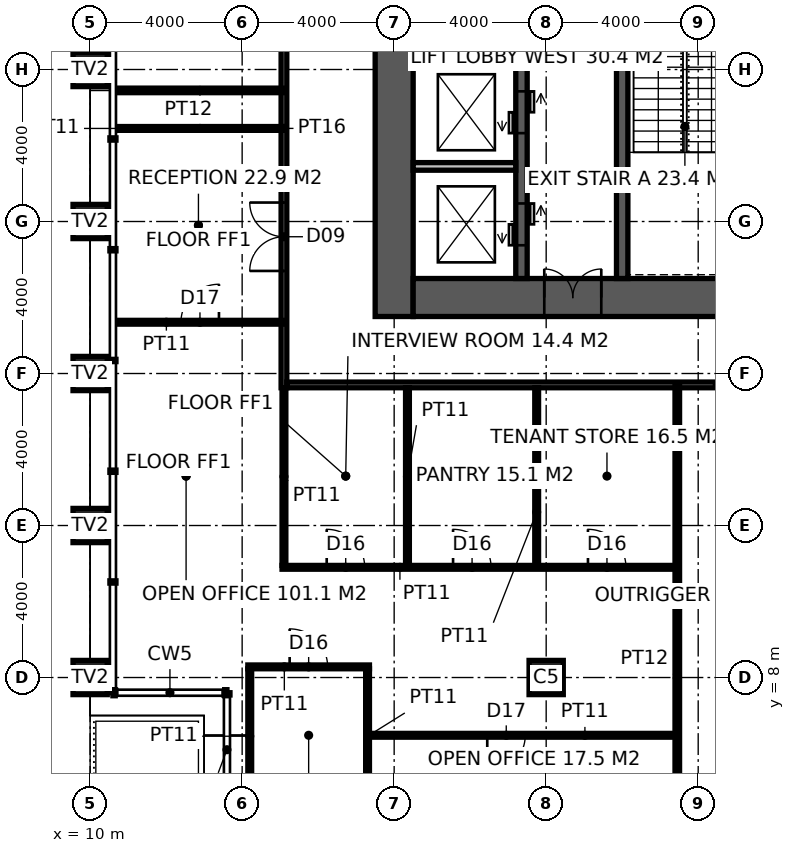
"""IFC4 building model, lengths in metres.
Left out: names, types, materials, properties, quantities, classifications, styles, units other than length and angle.
Written with IfcOpenShell. Run it as: python <this file> out.ifc"""

import sys

from ifc_helpers import new_model, si_unit, direction, frame, frame_2d, origin, origin_2d, place, context, subcontext, project, spatial, rectangle, hollow_rectangle, extrude, element, fill, save


model = new_model("IFC4")
c1 = context("Model", 3, precision=1e-05, world=origin(), true_north=direction((0.0, 1.0)))
c2 = subcontext(c1, "Body", "Model", "MODEL_VIEW")
j1 = project(units=[si_unit("LENGTHUNIT", "METRE"), si_unit("PLANEANGLEUNIT", "RADIAN")], contexts=[c1])
p1 = place(None, origin())
s1 = spatial("IfcSite", under=j1, at=p1, CompositionType="ELEMENT")
p2 = place(p1, origin())
s2 = spatial("IfcBuilding", under=s1, at=p2, CompositionType="ELEMENT")
p3 = place(p2, frame((0.0, 0.0, 105.4)))
s3 = spatial("IfcBuildingStorey", under=s2, at=p3, CompositionType="ELEMENT", Elevation=105.4)
for number, where, z_axis, x_axis in (
    (1, (10.0, 8.0, 0.0), (0.0, 0.0, 1.0), (1.0, 0.0, 0.0)),
    (2, (10.0, 12.0, 0.0), (0.0, 0.0, 1.0), (1.0, 0.0, 0.0)),
    (3, (10.0, 16.0, 0.0), (0.0, 0.0, 1.0), (1.0, 0.0, 0.0)),
    (4, (10.0, 20.0, 0.0), (0.0, 0.0, 1.0), (1.0, 0.0, 0.0)),
    (5, (10.0, 24.0, 0.0), (0.0, 0.0, 1.0), (1.0, 0.0, 0.0)),
):
    element("IfcColumn", number, at=place(p3, frame(where, z_axis=z_axis, x_axis=x_axis)), inside=s3, PredefinedType="USERDEFINED", context=c2, shape_type="SweptSolid", body=[
        extrude(hollow_rectangle(XDim=0.9, YDim=0.9, WallThickness=0.1, at=origin_2d()), origin(), (0.0, 0.0, 1.0), 4.0),
    ])
p4 = place(p3, frame((22.0, 8.0, 0.0), z_axis=(0.0, 0.0, 1.0), x_axis=(1.0, 0.0, 0.0)))
e6 = element("IfcColumn", 6, at=p4, inside=s3, PredefinedType="COLUMN", context=c2, shape_type="SweptSolid", body=[
    extrude(hollow_rectangle(XDim=0.9, YDim=0.9, WallThickness=0.1, at=origin_2d()), origin(), (0.0, 0.0, 1.0), 4.0),
])
p5 = place(p3, frame((18.0, 17.5, -0.15), z_axis=(0.0, 0.0, 1.0), x_axis=(0.0, 1.0, 0.0)))
e7 = element("IfcWall", 7, at=p5, inside=s3, PredefinedType="SHEAR", context=c2, shape_type="SweptSolid", body=[
    extrude(rectangle(XDim=19.0, YDim=1.0, at=frame_2d((9.5, 0.0))), origin(), (0.0, 0.0, 1.0), 4.0),
])
p6 = place(p3, frame((18.5, 18.0, -0.15), z_axis=(0.0, 0.0, 1.0), x_axis=(1.0, 0.0, 0.0)))
e8 = element("IfcWall", 8, at=p6, inside=s3, PredefinedType="SHEAR", context=c2, shape_type="SweptSolid", body=[
    extrude(rectangle(XDim=17.6, YDim=1.0, at=frame_2d((8.8, 0.0))), origin(), (0.0, 0.0, 1.0), 4.0),
])
p7 = place(p6, frame((3.45, 0.0, 0.15)))
e9 = element("IfcOpeningElement", 9, at=p7, cuts=e8, PredefinedType="OPENING", context=c2, shape_type="SweptSolid", body=[
    extrude(rectangle(XDim=1.5, YDim=2.4, at=frame_2d((0.75, 1.2))), frame((0.0, 0.51, 0.0), z_axis=(0.0, -1.0, 0.0), x_axis=(1.0, 0.0, 0.0)), (0.0, 0.0, 1.0), 1.02),
])
p8 = place(p3, frame((24.0, 18.5, -0.15), z_axis=(0.0, 0.0, 1.0), x_axis=(0.0, 1.0, 0.0)))
e10 = element("IfcWall", 10, at=p8, inside=s3, PredefinedType="SHEAR", context=c2, shape_type="SweptSolid", body=[
    extrude(rectangle(XDim=17.0, YDim=0.3, at=frame_2d((8.5, 0.0))), origin(), (0.0, 0.0, 1.0), 4.0),
])
p9 = place(p8, frame((9.6, 0.0, 0.15)))
e11 = element("IfcOpeningElement", 11, at=p9, cuts=e10, PredefinedType="OPENING", context=c2, shape_type="SweptSolid", body=[
    extrude(rectangle(XDim=1.5, YDim=2.4, at=frame_2d((0.75, 1.2))), frame((0.0, 0.16, 0.0), z_axis=(0.0, -1.0, 0.0), x_axis=(1.0, 0.0, 0.0)), (0.0, 0.0, 1.0), 0.32),
])
p10 = place(p3, frame((21.35, 18.5, -0.15), z_axis=(0.0, 0.0, 1.0), x_axis=(0.0, 1.0, 0.0)))
e12 = element("IfcWall", 12, at=p10, inside=s3, PredefinedType="SHEAR", context=c2, shape_type="SweptSolid", body=[
    extrude(rectangle(XDim=12.5, YDim=0.3, at=frame_2d((6.25, 0.0))), origin(), (0.0, 0.0, 1.0), 4.0),
])
p11 = place(p10, frame((0.875, 0.0, 0.15)))
e13 = element("IfcOpeningElement", 13, at=p11, cuts=e12, PredefinedType="OPENING", context=c2, shape_type="SweptSolid", body=[
    extrude(rectangle(XDim=1.1, YDim=2.2, at=frame_2d((0.55, 1.1))), frame((0.0, 0.16, 0.0), z_axis=(0.0, -1.0, 0.0), x_axis=(1.0, 0.0, 0.0)), (0.0, 0.0, 1.0), 0.32),
])
p12 = place(p10, frame((3.825, 0.0, 0.15)))
e14 = element("IfcOpeningElement", 14, at=p12, cuts=e12, PredefinedType="OPENING", context=c2, shape_type="SweptSolid", body=[
    extrude(rectangle(XDim=1.1, YDim=2.2, at=frame_2d((0.55, 1.1))), frame((0.0, 0.16, 0.0), z_axis=(0.0, -1.0, 0.0), x_axis=(1.0, 0.0, 0.0)), (0.0, 0.0, 1.0), 0.32),
])
p13 = place(p10, frame((6.675, 0.0, 0.15)))
e15 = element("IfcOpeningElement", 15, at=p13, cuts=e12, PredefinedType="OPENING", context=c2, shape_type="SweptSolid", body=[
    extrude(rectangle(XDim=1.1, YDim=2.2, at=frame_2d((0.55, 1.1))), frame((0.0, 0.16, 0.0), z_axis=(0.0, -1.0, 0.0), x_axis=(1.0, 0.0, 0.0)), (0.0, 0.0, 1.0), 0.32),
])
p14 = place(p10, frame((9.575, 0.0, 0.15)))
e16 = element("IfcOpeningElement", 16, at=p14, cuts=e12, PredefinedType="OPENING", context=c2, shape_type="SweptSolid", body=[
    extrude(rectangle(XDim=1.1, YDim=2.2, at=frame_2d((0.55, 1.1))), frame((0.0, 0.16, 0.0), z_axis=(0.0, -1.0, 0.0), x_axis=(1.0, 0.0, 0.0)), (0.0, 0.0, 1.0), 0.32),
])
for number, where, z_axis, x_axis in (
    (17, (18.5, 21.45, -0.15), (0.0, 0.0, 1.0), (1.0, 0.0, 0.0)),
    (18, (18.5, 24.3, -0.15), (0.0, 0.0, 1.0), (1.0, 0.0, 0.0)),
):
    element("IfcWall", number, at=place(p3, frame(where, z_axis=z_axis, x_axis=x_axis)), inside=s3, PredefinedType="SOLIDWALL", context=c2, shape_type="SweptSolid", body=[
        extrude(rectangle(XDim=2.7, YDim=0.2, at=frame_2d((1.35, 0.0))), origin(), (0.0, 0.0, 1.0), 4.0),
    ])
p15 = place(p3, frame((15.1, 15.625, 0.0), z_axis=(0.0, 0.0, 1.0), x_axis=(0.0, 1.0, 0.0)))
e19 = element("IfcWall", 19, at=p15, inside=s3, PredefinedType="PARTITIONING", context=c2, shape_type="SweptSolid", body=[
    extrude(rectangle(XDim=22.75, YDim=0.15, at=frame_2d((11.375, 0.0))), origin(), (0.0, 0.0, 1.0), 3.85),
])
p16 = place(p15, frame((3.074, 0.0, 0.0)))
e20 = element("IfcOpeningElement", 20, at=p16, cuts=e19, PredefinedType="OPENING", context=c2, shape_type="SweptSolid", body=[
    extrude(rectangle(XDim=1.8, YDim=2.4, at=frame_2d((0.9, 1.2))), frame((0.0, 0.085, 0.0), z_axis=(0.0, -1.0, 0.0), x_axis=(1.0, 0.0, 0.0)), (0.0, 0.0, 1.0), 0.17),
])
p17 = place(p15, frame((16.876, 0.0, 0.0)))
e21 = element("IfcOpeningElement", 21, at=p17, cuts=e19, PredefinedType="OPENING", context=c2, shape_type="SweptSolid", body=[
    extrude(rectangle(XDim=1.8, YDim=2.4, at=frame_2d((0.9, 1.2))), frame((0.0, 0.085, 0.0), z_axis=(0.0, -1.0, 0.0), x_axis=(1.0, 0.0, 0.0)), (0.0, 0.0, 1.0), 0.17),
])
p18 = place(p15, frame((9.875, 0.0, 0.0)))
e22 = element("IfcOpeningElement", 22, at=p18, cuts=e19, PredefinedType="OPENING", context=c2, shape_type="SweptSolid", body=[
    extrude(rectangle(XDim=1.0, YDim=2.2, at=frame_2d((0.5, 1.1))), frame((0.0, 0.085, 0.0), z_axis=(0.0, -1.0, 0.0), x_axis=(1.0, 0.0, 0.0)), (0.0, 0.0, 1.0), 0.17),
])
p19 = place(p3, frame((15.175, 15.7, 0.0), z_axis=(0.0, 0.0, 1.0), x_axis=(1.0, 0.0, 0.0)))
e23 = element("IfcWall", 23, at=p19, inside=s3, PredefinedType="PARTITIONING", context=c2, shape_type="SweptSolid", body=[
    extrude(rectangle(XDim=22.65, YDim=0.15, at=frame_2d((11.325, 0.0))), origin(), (0.0, 0.0, 1.0), 3.85),
])
p20 = place(p19, frame((12.325, 0.0, 0.0)))
e24 = element("IfcOpeningElement", 24, at=p20, cuts=e23, PredefinedType="OPENING", context=c2, shape_type="SweptSolid", body=[
    extrude(rectangle(XDim=1.0, YDim=2.2, at=frame_2d((0.5, 1.1))), frame((0.0, 0.085, 0.0), z_axis=(0.0, -1.0, 0.0), x_axis=(1.0, 0.0, 0.0)), (0.0, 0.0, 1.0), 0.17),
])
p21 = place(p3, frame((25.45, 4.68, 0.0), z_axis=(0.0, 0.0, 1.0), x_axis=(0.0, 1.0, 0.0)))
e25 = element("IfcWall", 25, at=p21, inside=s3, PredefinedType="PARTITIONING", context=c2, shape_type="SweptSolid", body=[
    extrude(rectangle(XDim=11.02, YDim=0.12, at=frame_2d((5.51, 0.0))), origin(), (0.0, 0.0, 1.0), 2.65),
])
p22 = place(p3, frame((10.68, 23.45, 0.0), z_axis=(0.0, 0.0, 1.0), x_axis=(1.0, 0.0, 0.0)))
e26 = element("IfcWall", 26, at=p22, inside=s3, PredefinedType="PARTITIONING", context=c2, shape_type="SweptSolid", body=[
    extrude(rectangle(XDim=4.42, YDim=0.12, at=frame_2d((2.21, 0.0))), origin(), (0.0, 0.0, 1.0), 2.65),
])
p23 = place(p3, frame((14.15, 8.28, 0.0), z_axis=(0.0, 0.0, 1.0), x_axis=(1.0, 0.0, 0.0)))
e27 = element("IfcWall", 27, at=p23, inside=s3, PredefinedType="PARTITIONING", context=c2, shape_type="SweptSolid", body=[
    extrude(rectangle(XDim=3.2, YDim=0.1, at=frame_2d((1.6, 0.0))), origin(), (0.0, 0.0, 1.0), 3.85),
])
p24 = place(p23, frame((1.1, 0.0, 0.0)))
e28 = element("IfcOpeningElement", 28, at=p24, cuts=e27, PredefinedType="OPENING", context=c2, shape_type="SweptSolid", body=[
    extrude(rectangle(XDim=1.0, YDim=2.2, at=frame_2d((0.5, 1.1))), frame((0.0, 0.06, 0.0), z_axis=(0.0, -1.0, 0.0), x_axis=(1.0, 0.0, 0.0)), (0.0, 0.0, 1.0), 0.12),
])
p25 = place(p3, frame((15.05, 10.9, 0.0), z_axis=(0.0, 0.0, 1.0), x_axis=(1.0, 0.0, 0.0)))
e29 = element("IfcWall", 29, at=p25, inside=s3, PredefinedType="PARTITIONING", context=c2, shape_type="SweptSolid", body=[
    extrude(rectangle(XDim=10.339, YDim=0.1, at=frame_2d((5.169, 0.0))), origin(), (0.0, 0.0, 1.0), 3.85),
])
p26 = place(p25, frame((1.175, 0.0, 0.0)))
e30 = element("IfcOpeningElement", 30, at=p26, cuts=e29, PredefinedType="OPENING", context=c2, shape_type="SweptSolid", body=[
    extrude(rectangle(XDim=1.0, YDim=2.2, at=frame_2d((0.5, 1.1))), frame((0.0, 0.06, 0.0), z_axis=(0.0, -1.0, 0.0), x_axis=(1.0, 0.0, 0.0)), (0.0, 0.0, 1.0), 0.12),
])
p27 = place(p25, frame((4.5, 0.0, 0.0)))
e31 = element("IfcOpeningElement", 31, at=p27, cuts=e29, PredefinedType="OPENING", context=c2, shape_type="SweptSolid", body=[
    extrude(rectangle(XDim=1.0, YDim=2.2, at=frame_2d((0.5, 1.1))), frame((0.0, 0.06, 0.0), z_axis=(0.0, -1.0, 0.0), x_axis=(1.0, 0.0, 0.0)), (0.0, 0.0, 1.0), 0.12),
])
p28 = place(p25, frame((8.05, 0.0, 0.0)))
e32 = element("IfcOpeningElement", 32, at=p28, cuts=e29, PredefinedType="OPENING", context=c2, shape_type="SweptSolid", body=[
    extrude(rectangle(XDim=1.0, YDim=2.2, at=frame_2d((0.5, 1.1))), frame((0.0, 0.06, 0.0), z_axis=(0.0, -1.0, 0.0), x_axis=(1.0, 0.0, 0.0)), (0.0, 0.0, 1.0), 0.12),
])
p29 = place(p3, frame((14.2, 4.68, 0.0), z_axis=(0.0, 0.0, 1.0), x_axis=(0.0, 1.0, 0.0)))
e33 = element("IfcWall", 33, at=p29, inside=s3, PredefinedType="PARTITIONING", context=c2, shape_type="SweptSolid", body=[
    extrude(rectangle(XDim=3.55, YDim=0.1, at=frame_2d((1.775, 0.0))), origin(), (0.0, 0.0, 1.0), 2.65),
])
p30 = place(p3, frame((15.1, 10.95, 0.0), z_axis=(0.0, 0.0, 1.0), x_axis=(0.0, 1.0, 0.0)))
e34 = element("IfcWall", 34, at=p30, inside=s3, PredefinedType="PARTITIONING", context=c2, shape_type="SweptSolid", body=[
    extrude(rectangle(XDim=4.675, YDim=0.1, at=frame_2d((2.337, 0.0))), origin(), (0.0, 0.0, 1.0), 3.85),
])
p31 = place(p3, frame((17.3, 4.68, 0.0), z_axis=(0.0, 0.0, 1.0), x_axis=(0.0, 1.0, 0.0)))
e35 = element("IfcWall", 35, at=p31, inside=s3, PredefinedType="PARTITIONING", context=c2, shape_type="SweptSolid", body=[
    extrude(rectangle(XDim=3.55, YDim=0.1, at=frame_2d((1.775, 0.0))), origin(), (0.0, 0.0, 1.0), 3.85),
])
for number, where, z_axis, x_axis in (
    (36, (18.35, 10.95, 0.0), (0.0, 0.0, 1.0), (0.0, 1.0, 0.0)),
    (37, (21.75, 10.95, 0.0), (0.0, 0.0, 1.0), (0.0, 1.0, 0.0)),
):
    element("IfcWall", number, at=place(p3, frame(where, z_axis=z_axis, x_axis=x_axis)), inside=s3, PredefinedType="PARTITIONING", context=c2, shape_type="SweptSolid", body=[
        extrude(rectangle(XDim=4.675, YDim=0.1, at=frame_2d((2.337, 0.0))), origin(), (0.0, 0.0, 1.0), 2.65),
    ])
p32 = place(p3, frame((25.449, 6.48, 0.0), z_axis=(0.0, 0.0, 1.0), x_axis=(-1.0, 0.0, 0.0)))
e38 = element("IfcWall", 38, at=p32, inside=s3, PredefinedType="PARTITIONING", context=c2, shape_type="SweptSolid", body=[
    extrude(rectangle(XDim=8.099, YDim=0.1, at=frame_2d((4.049, 0.0))), origin(), (0.0, 0.0, 1.0), 3.85),
])
p33 = place(p32, frame((4.0, 0.0, 0.0)))
e39 = element("IfcOpeningElement", 39, at=p33, cuts=e38, PredefinedType="OPENING", context=c2, shape_type="SweptSolid", body=[
    extrude(rectangle(XDim=1.0, YDim=2.2, at=frame_2d((0.5, 1.1))), frame((0.0, 0.06, 0.0), z_axis=(0.0, -1.0, 0.0), x_axis=(1.0, 0.0, 0.0)), (0.0, 0.0, 1.0), 0.12),
])
p34 = place(p3, frame((15.1, 22.449, 0.0), z_axis=(0.0, 0.0, 1.0), x_axis=(-1.0, 0.0, 0.0)))
e40 = element("IfcWall", 40, at=p34, inside=s3, PredefinedType="PARTITIONING", context=c2, shape_type="SweptSolid", body=[
    extrude(rectangle(XDim=4.42, YDim=0.1, at=frame_2d((2.21, 0.0))), origin(), (0.0, 0.0, 1.0), 3.85),
])
p35 = place(p3, frame((10.68, 17.349, 0.0), z_axis=(0.0, 0.0, 1.0), x_axis=(1.0, 0.0, 0.0)))
e41 = element("IfcWall", 41, at=p35, inside=s3, PredefinedType="PARTITIONING", context=c2, shape_type="SweptSolid", body=[
    extrude(rectangle(XDim=4.42, YDim=0.1, at=frame_2d((2.21, 0.0))), origin(), (0.0, 0.0, 1.0), 3.85),
])
p36 = place(p35, frame((1.71, 0.0, 0.0)))
e42 = element("IfcOpeningElement", 42, at=p36, cuts=e41, PredefinedType="OPENING", context=c2, shape_type="SweptSolid", body=[
    extrude(rectangle(XDim=1.0, YDim=2.2, at=frame_2d((0.5, 1.1))), frame((0.0, 0.06, 0.0), z_axis=(0.0, -1.0, 0.0), x_axis=(1.0, 0.0, 0.0)), (0.0, 0.0, 1.0), 0.12),
])
p37 = place(p7, origin())
e43 = element("IfcDoor", 43, at=p37, inside=s3, OperationType="DOUBLE_DOOR_DOUBLE_SWING", PredefinedType="DOOR", context=c2, shape_type="SweptSolid", body=[
    extrude(rectangle(XDim=1.5, YDim=2.4, at=frame_2d((0.75, 1.2))), frame((0.0, 0.025, 0.0), z_axis=(0.0, -1.0, 0.0), x_axis=(1.0, 0.0, 0.0)), (0.0, 0.0, 1.0), 0.05),
])
fill(e9, e43)
p38 = place(p16, origin())
e44 = element("IfcDoor", 44, at=p38, inside=s3, OperationType="DOUBLE_DOOR_DOUBLE_SWING", PredefinedType="DOOR", context=c2, shape_type="SweptSolid", body=[
    extrude(rectangle(XDim=1.8, YDim=2.4, at=frame_2d((0.9, 1.2))), frame((0.0, 0.025, 0.0), z_axis=(0.0, -1.0, 0.0), x_axis=(1.0, 0.0, 0.0)), (0.0, 0.0, 1.0), 0.05),
])
fill(e20, e44)
p39 = place(p26, origin())
e45 = element("IfcDoor", 45, at=p39, inside=s3, OperationType="SINGLE_SWING_LEFT", PredefinedType="DOOR", context=c2, shape_type="SweptSolid", body=[
    extrude(rectangle(XDim=1.0, YDim=2.2, at=frame_2d((0.5, 1.1))), frame((0.0, 0.025, 0.0), z_axis=(0.0, -1.0, 0.0), x_axis=(1.0, 0.0, 0.0)), (0.0, 0.0, 1.0), 0.05),
])
fill(e30, e45)
p40 = place(p27, origin())
e46 = element("IfcDoor", 46, at=p40, inside=s3, OperationType="SINGLE_SWING_LEFT", PredefinedType="DOOR", context=c2, shape_type="SweptSolid", body=[
    extrude(rectangle(XDim=1.0, YDim=2.2, at=frame_2d((0.5, 1.1))), frame((0.0, 0.025, 0.0), z_axis=(0.0, -1.0, 0.0), x_axis=(1.0, 0.0, 0.0)), (0.0, 0.0, 1.0), 0.05),
])
fill(e31, e46)
p41 = place(p28, origin())
e47 = element("IfcDoor", 47, at=p41, inside=s3, OperationType="SINGLE_SWING_LEFT", PredefinedType="DOOR", context=c2, shape_type="SweptSolid", body=[
    extrude(rectangle(XDim=1.0, YDim=2.2, at=frame_2d((0.5, 1.1))), frame((0.0, 0.025, 0.0), z_axis=(0.0, -1.0, 0.0), x_axis=(1.0, 0.0, 0.0)), (0.0, 0.0, 1.0), 0.05),
])
fill(e32, e47)
p42 = place(p24, origin())
e48 = element("IfcDoor", 48, at=p42, inside=s3, OperationType="SINGLE_SWING_LEFT", PredefinedType="DOOR", context=c2, shape_type="SweptSolid", body=[
    extrude(rectangle(XDim=1.0, YDim=2.2, at=frame_2d((0.5, 1.1))), frame((0.0, 0.025, 0.0), z_axis=(0.0, -1.0, 0.0), x_axis=(1.0, 0.0, 0.0)), (0.0, 0.0, 1.0), 0.05),
])
fill(e28, e48)
p43 = place(p33, origin())
e49 = element("IfcDoor", 49, at=p43, inside=s3, OperationType="SINGLE_SWING_RIGHT", PredefinedType="DOOR", context=c2, shape_type="SweptSolid", body=[
    extrude(rectangle(XDim=1.0, YDim=2.2, at=frame_2d((0.5, 1.1))), frame((0.0, 0.025, 0.0), z_axis=(0.0, -1.0, 0.0), x_axis=(1.0, 0.0, 0.0)), (0.0, 0.0, 1.0), 0.05),
])
fill(e39, e49)
p44 = place(p36, origin())
e50 = element("IfcDoor", 50, at=p44, inside=s3, OperationType="SINGLE_SWING_RIGHT", PredefinedType="DOOR", context=c2, shape_type="SweptSolid", body=[
    extrude(rectangle(XDim=1.0, YDim=2.2, at=frame_2d((0.5, 1.1))), frame((0.0, 0.025, 0.0), z_axis=(0.0, -1.0, 0.0), x_axis=(1.0, 0.0, 0.0)), (0.0, 0.0, 1.0), 0.05),
])
fill(e42, e50)
p45 = place(p11, origin())
e51 = element("IfcDoor", 51, at=p45, inside=s3, OperationType="DOUBLE_DOOR_SLIDING", PredefinedType="DOOR", context=c2, shape_type="SweptSolid", body=[
    extrude(rectangle(XDim=1.1, YDim=2.2, at=frame_2d((0.55, 1.1))), frame((0.0, 0.025, 0.0), z_axis=(0.0, -1.0, 0.0), x_axis=(1.0, 0.0, 0.0)), (0.0, 0.0, 1.0), 0.05),
])
fill(e13, e51)
p46 = place(p12, origin())
e52 = element("IfcDoor", 52, at=p46, inside=s3, OperationType="DOUBLE_DOOR_SLIDING", PredefinedType="DOOR", context=c2, shape_type="SweptSolid", body=[
    extrude(rectangle(XDim=1.1, YDim=2.2, at=frame_2d((0.55, 1.1))), frame((0.0, 0.025, 0.0), z_axis=(0.0, -1.0, 0.0), x_axis=(1.0, 0.0, 0.0)), (0.0, 0.0, 1.0), 0.05),
])
fill(e14, e52)
save(model, sys.argv[1])
